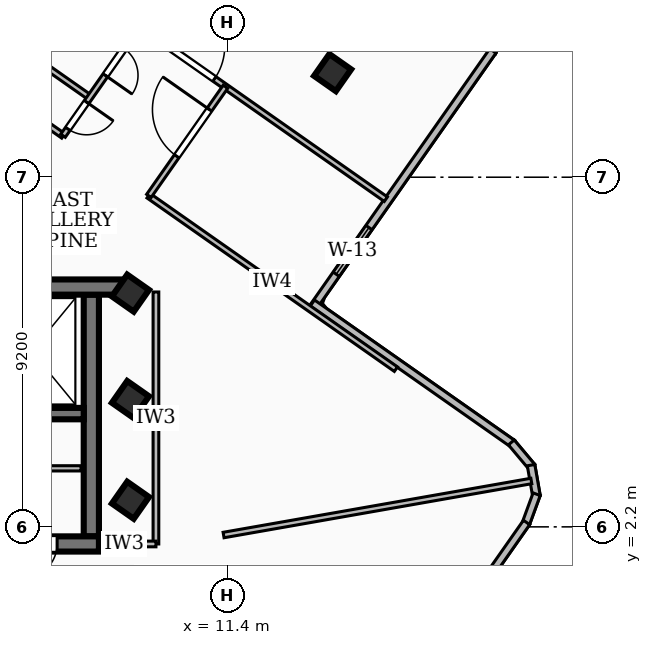
"""IFC4 building model, lengths in metres.
Left out: names, types, materials, properties, quantities, classifications, styles, units other than length and angle.
Written with IfcOpenShell. Run it as: python <this file> out.ifc"""

import sys

from ifc_helpers import new_model, si_unit, direction, frame, frame_2d, origin, origin_2d, place, context, subcontext, project, spatial, rectangle, extrude, element, fill, save


model = new_model("IFC4")
c1 = context("Model", 3, precision=1e-05, world=origin(), true_north=direction((0.0, 1.0)))
c2 = subcontext(c1, "Body", "Model", "MODEL_VIEW")
j1 = project(units=[si_unit("LENGTHUNIT", "METRE"), si_unit("PLANEANGLEUNIT", "RADIAN")], contexts=[c1])
p1 = place(None, origin())
s1 = spatial("IfcSite", under=j1, at=p1, CompositionType="ELEMENT")
p2 = place(p1, origin())
s2 = spatial("IfcBuilding", under=s1, at=p2, CompositionType="ELEMENT")
p3 = place(p2, frame((0.0, 0.0, 268.02)))
s3 = spatial("IfcBuildingStorey", under=s2, at=p3, CompositionType="ELEMENT", Elevation=268.02)
p4 = place(p3, frame((-8.78, 8.51, 0.0), z_axis=(0.0, 0.0, 1.0), x_axis=(1.0, 0.0, 0.0)))
e1 = element("IfcWall", 1, at=p4, inside=s3, PredefinedType="SHEAR", context=c2, shape_type="SweptSolid", body=[
    extrude(rectangle(XDim=17.56, YDim=0.4, at=frame_2d((8.78, 0.0))), origin(), (0.0, 0.0, 1.0), 3.16),
])
p5 = place(p3, frame((8.02, 1.75, 0.0), z_axis=(0.0, 0.0, 1.0), x_axis=(-1.0, 0.0, 0.0)))
e2 = element("IfcWall", 2, at=p5, inside=s3, PredefinedType="SHEAR", context=c2, shape_type="SweptSolid", body=[
    extrude(rectangle(XDim=16.04, YDim=0.4, at=frame_2d((8.02, 0.0))), origin(), (0.0, 0.0, 1.0), 3.16),
])
p6 = place(p5, frame((7.45, 0.0, 0.0)))
e3 = element("IfcOpeningElement", 3, at=p6, cuts=e2, PredefinedType="OPENING", context=c2, shape_type="SweptSolid", body=[
    extrude(rectangle(XDim=1.0, YDim=2.1, at=frame_2d((0.5, 1.05))), frame((0.0, 0.21, 0.0), z_axis=(0.0, -1.0, 0.0), x_axis=(1.0, 0.0, 0.0)), (0.0, 0.0, 1.0), 0.42),
])
p7 = place(p5, frame((14.285, 0.0, 0.0)))
e4 = element("IfcOpeningElement", 4, at=p7, cuts=e2, PredefinedType="OPENING", context=c2, shape_type="SweptSolid", body=[
    extrude(rectangle(XDim=1.05, YDim=2.15, at=frame_2d((0.525, 1.075))), frame((0.0, 0.21, 0.0), z_axis=(0.0, -1.0, 0.0), x_axis=(1.0, 0.0, 0.0)), (0.0, 0.0, 1.0), 0.42),
])
p8 = place(p5, frame((12.725, 0.0, 0.0)))
e5 = element("IfcOpeningElement", 5, at=p8, cuts=e2, PredefinedType="OPENING", context=c2, shape_type="SweptSolid", body=[
    extrude(rectangle(XDim=1.05, YDim=2.15, at=frame_2d((0.525, 1.075))), frame((0.0, 0.21, 0.0), z_axis=(0.0, -1.0, 0.0), x_axis=(1.0, 0.0, 0.0)), (0.0, 0.0, 1.0), 0.42),
])
p9 = place(p5, frame((11.165, 0.0, 0.0)))
e6 = element("IfcOpeningElement", 6, at=p9, cuts=e2, PredefinedType="OPENING", context=c2, shape_type="SweptSolid", body=[
    extrude(rectangle(XDim=1.05, YDim=2.15, at=frame_2d((0.525, 1.075))), frame((0.0, 0.21, 0.0), z_axis=(0.0, -1.0, 0.0), x_axis=(1.0, 0.0, 0.0)), (0.0, 0.0, 1.0), 0.42),
])
p10 = place(p5, frame((3.4, 0.0, 0.0)))
e7 = element("IfcOpeningElement", 7, at=p10, cuts=e2, PredefinedType="OPENING", context=c2, shape_type="SweptSolid", body=[
    extrude(rectangle(XDim=0.9, YDim=2.06, at=frame_2d((0.45, 1.03))), frame((0.0, 0.21, 0.0), z_axis=(0.0, -1.0, 0.0), x_axis=(1.0, 0.0, 0.0)), (0.0, 0.0, 1.0), 0.42),
])
p11 = place(p5, frame((1.1, 0.0, 0.0)))
e8 = element("IfcOpeningElement", 8, at=p11, cuts=e2, PredefinedType="OPENING", context=c2, shape_type="SweptSolid", body=[
    extrude(rectangle(XDim=0.9, YDim=2.06, at=frame_2d((0.45, 1.03))), frame((0.0, 0.21, 0.0), z_axis=(0.0, -1.0, 0.0), x_axis=(1.0, 0.0, 0.0)), (0.0, 0.0, 1.0), 0.42),
])
p12 = place(p3, frame((7.82, 8.31, 0.0), z_axis=(0.0, 0.0, 1.0), x_axis=(0.0, -1.0, 0.0)))
e9 = element("IfcWall", 9, at=p12, inside=s3, PredefinedType="SHEAR", context=c2, shape_type="SweptSolid", body=[
    extrude(rectangle(XDim=6.36, YDim=0.4, at=frame_2d((3.18, 0.0))), origin(), (0.0, 0.0, 1.0), 3.16),
])
p13 = place(p3, frame((7.62, 5.18, 0.0), z_axis=(0.0, 0.0, 1.0), x_axis=(-1.0, 0.0, 0.0)))
e10 = element("IfcWall", 10, at=p13, inside=s3, PredefinedType="SOLIDWALL", context=c2, shape_type="SweptSolid", body=[
    extrude(rectangle(XDim=15.24, YDim=0.3, at=frame_2d((7.62, 0.0))), origin(), (0.0, 0.0, 1.0), 3.16),
])
p14 = place(p13, frame((5.77, 0.0, 0.0)))
e11 = element("IfcOpeningElement", 11, at=p14, cuts=e10, PredefinedType="OPENING", context=c2, shape_type="SweptSolid", body=[
    extrude(rectangle(XDim=1.1, YDim=2.15, at=frame_2d((0.55, 1.075))), frame((0.0, 0.16, 0.0), z_axis=(0.0, -1.0, 0.0), x_axis=(1.0, 0.0, 0.0)), (0.0, 0.0, 1.0), 0.32),
])
p15 = place(p13, frame((2.97, 0.0, 0.0)))
e12 = element("IfcOpeningElement", 12, at=p15, cuts=e10, PredefinedType="OPENING", context=c2, shape_type="SweptSolid", body=[
    extrude(rectangle(XDim=1.1, YDim=2.15, at=frame_2d((0.55, 1.075))), frame((0.0, 0.16, 0.0), z_axis=(0.0, -1.0, 0.0), x_axis=(1.0, 0.0, 0.0)), (0.0, 0.0, 1.0), 0.32),
])
p16 = place(p13, frame((7.97, 0.0, 0.0)))
e13 = element("IfcOpeningElement", 13, at=p16, cuts=e10, PredefinedType="OPENING", context=c2, shape_type="SweptSolid", body=[
    extrude(rectangle(XDim=1.0, YDim=2.1, at=frame_2d((0.5, 1.05))), frame((0.0, 0.16, 0.0), z_axis=(0.0, -1.0, 0.0), x_axis=(1.0, 0.0, 0.0)), (0.0, 0.0, 1.0), 0.32),
])
for number, where, z_axis, x_axis in (
    (14, (8.85, 2.9, 0.0), (0.0, 0.0, 1.0), (0.574, 0.819, 0.0)),
    (15, (8.85, 5.55, 0.0), (0.0, 0.0, 1.0), (0.574, 0.819, 0.0)),
    (16, (8.85, 8.35, 0.0), (0.0, 0.0, 1.0), (0.574, 0.819, 0.0)),
    (17, (14.169, 14.152, 0.0), (0.0, 0.0, 1.0), (0.574, 0.819, 0.0)),
):
    element("IfcColumn", number, at=place(p3, frame(where, z_axis=z_axis, x_axis=x_axis)), inside=s3, PredefinedType="COLUMN", context=c2, shape_type="SweptSolid", body=[
        extrude(rectangle(XDim=0.7, YDim=0.7, at=origin_2d()), origin(), (0.0, 0.0, 1.0), 3.42),
    ])
p17 = place(p3, frame((18.651, 15.467, 0.0), z_axis=(0.0, 0.0, 1.0), x_axis=(-0.343826172689, -0.939033313027, 0.0)))
e18 = element("IfcWall", 18, at=p17, inside=s3, PredefinedType="SOLIDWALL", context=c2, shape_type="SweptSolid", body=[
    extrude(rectangle(XDim=0.837, YDim=0.2, at=frame_2d((0.418, 0.0))), origin(), (0.0, 0.0, 1.0), 3.16),
])
p18 = place(p3, frame((18.386, 14.724, 0.0), z_axis=(0.0, 0.0, 1.0), x_axis=(-0.574193796103, -0.818719417454, 0.0)))
e19 = element("IfcWall", 19, at=p18, inside=s3, PredefinedType="SOLIDWALL", context=c2, shape_type="SweptSolid", body=[
    extrude(rectangle(XDim=8.241, YDim=0.2, at=frame_2d((4.121, 0.0))), origin(), (0.0, 0.0, 1.0), 3.16),
])
p19 = place(p18, frame((5.678, 0.0, 0.85)))
e20 = element("IfcOpeningElement", 20, at=p19, cuts=e19, PredefinedType="OPENING", context=c2, shape_type="SweptSolid", body=[
    extrude(rectangle(XDim=1.5, YDim=1.8, at=frame_2d((0.75, 0.9))), frame((0.0, 0.11, 0.0), z_axis=(0.0, -1.0, 0.0), x_axis=(1.0, 0.0, 0.0)), (0.0, 0.0, 1.0), 0.22),
])
p20 = place(p3, frame((13.635, 8.088, 0.0), z_axis=(0.0, 0.0, 1.0), x_axis=(0.818654548261, -0.574286279317, 0.0)))
e21 = element("IfcWall", 21, at=p20, inside=s3, PredefinedType="SOLIDWALL", context=c2, shape_type="SweptSolid", body=[
    extrude(rectangle(XDim=6.441, YDim=0.2, at=frame_2d((3.22, 0.0))), origin(), (0.0, 0.0, 1.0), 3.16),
])
p21 = place(p3, frame((18.872, 4.422, 0.0), z_axis=(0.0, 0.0, 1.0), x_axis=(0.642816318642, -0.766020352528, 0.0)))
e22 = element("IfcWall", 22, at=p21, inside=s3, PredefinedType="SOLIDWALL", context=c2, shape_type="SweptSolid", body=[
    extrude(rectangle(XDim=0.838, YDim=0.2, at=frame_2d((0.419, 0.0))), origin(), (0.0, 0.0, 1.0), 3.16),
])
p22 = place(p3, frame((19.391, 3.824, 0.0), z_axis=(0.0, 0.0, 1.0), x_axis=(0.171877988141, -0.985118245285, 0.0)))
e23 = element("IfcWall", 23, at=p22, inside=s3, PredefinedType="SOLIDWALL", context=c2, shape_type="SweptSolid", body=[
    extrude(rectangle(XDim=0.825, YDim=0.2, at=frame_2d((0.413, 0.0))), origin(), (0.0, 0.0, 1.0), 3.16),
])
p23 = place(p3, frame((19.538, 3.059, 0.0), z_axis=(0.0, 0.0, 1.0), x_axis=(-0.344083284363, -0.938939131905, 0.0)))
e24 = element("IfcWall", 24, at=p23, inside=s3, PredefinedType="SOLIDWALL", context=c2, shape_type="SweptSolid", body=[
    extrude(rectangle(XDim=0.837, YDim=0.2, at=frame_2d((0.418, 0.0))), origin(), (0.0, 0.0, 1.0), 3.16),
])
p24 = place(p3, frame((19.273, 2.316, 0.0), z_axis=(0.0, 0.0, 1.0), x_axis=(-0.574227764949, -0.818695592978, 0.0)))
e25 = element("IfcWall", 25, at=p24, inside=s3, PredefinedType="SOLIDWALL", context=c2, shape_type="SweptSolid", body=[
    extrude(rectangle(XDim=6.741, YDim=0.2, at=frame_2d((3.371, 0.0))), origin(), (0.0, 0.0, 1.0), 3.16),
])
p25 = place(p3, frame((2.9, 3.74, 0.0), z_axis=(0.0, 0.0, 1.0), x_axis=(1.0, 0.0, 0.0)))
e26 = element("IfcWall", 26, at=p25, inside=s3, PredefinedType="PARTITIONING", context=c2, shape_type="SweptSolid", body=[
    extrude(rectangle(XDim=4.65, YDim=0.138, at=frame_2d((2.325, 0.0))), origin(), (0.0, 0.0, 1.0), 3.16),
])
p26 = place(p3, frame((9.52, 1.75, 0.0), z_axis=(0.0, 0.0, 1.0), x_axis=(0.0, 1.0, 0.0)))
e27 = element("IfcWall", 27, at=p26, inside=s3, PredefinedType="PARTITIONING", context=c2, shape_type="SweptSolid", body=[
    extrude(rectangle(XDim=6.63, YDim=0.15, at=frame_2d((3.315, 0.0))), origin(), (0.0, 0.0, 1.0), 3.16),
])
p27 = place(p3, frame((7.85, 1.75, 0.0), z_axis=(0.0, 0.0, 1.0), x_axis=(1.0, 0.0, 0.0)))
e28 = element("IfcWall", 28, at=p27, inside=s3, PredefinedType="PARTITIONING", context=c2, shape_type="SweptSolid", body=[
    extrude(rectangle(XDim=1.67, YDim=0.15, at=frame_2d((0.835, 0.0))), origin(), (0.0, 0.0, 1.0), 2.39),
])
p28 = place(p3, frame((11.3, 1.985, 0.0), z_axis=(0.0, 0.0, 1.0), x_axis=(0.984932365377, 0.172939976965, 0.0)))
e29 = element("IfcWall", 29, at=p28, inside=s3, PredefinedType="PARTITIONING", context=c2, shape_type="SweptSolid", body=[
    extrude(rectangle(XDim=8.222, YDim=0.145, at=frame_2d((4.111, 0.0))), origin(), (0.0, 0.0, 1.0), 3.16),
])
p29 = place(p3, frame((7.083, 12.487, 0.0), z_axis=(0.0, 0.0, 1.0), x_axis=(-0.818818791344, 0.574052076855, 0.0)))
e30 = element("IfcWall", 30, at=p29, inside=s3, PredefinedType="PARTITIONING", context=c2, shape_type="SweptSolid", body=[
    extrude(rectangle(XDim=8.25, YDim=0.145, at=frame_2d((4.125, 0.0))), origin(), (0.0, 0.0, 1.0), 3.16),
])
p30 = place(p3, frame((15.835, 6.349, 0.0), z_axis=(0.0, 0.0, 1.0), x_axis=(-0.818780073776, 0.57410729902, 0.0)))
e31 = element("IfcWall", 31, at=p30, inside=s3, PredefinedType="PARTITIONING", context=c2, shape_type="SweptSolid", body=[
    extrude(rectangle(XDim=7.95, YDim=0.145, at=frame_2d((3.975, 0.0))), origin(), (0.0, 0.0, 1.0), 2.53),
])
p31 = place(p3, frame((7.765, 13.511, 0.0), z_axis=(0.0, 0.0, 1.0), x_axis=(-0.818761977847, 0.574133106198, 0.0)))
e32 = element("IfcWall", 32, at=p31, inside=s3, PredefinedType="PARTITIONING", context=c2, shape_type="SweptSolid", body=[
    extrude(rectangle(XDim=4.835, YDim=0.145, at=frame_2d((2.418, 0.0))), origin(), (0.0, 0.0, 1.0), 3.16),
])
p32 = place(p3, frame((9.09, 15.366, 0.0), z_axis=(0.0, 0.0, 1.0), x_axis=(-0.574097025606, -0.81878727713, 0.0)))
e33 = element("IfcWall", 33, at=p32, inside=s3, PredefinedType="PARTITIONING", context=c2, shape_type="SweptSolid", body=[
    extrude(rectangle(XDim=3.51, YDim=0.145, at=frame_2d((1.755, 0.0))), origin(), (0.0, 0.0, 1.0), 3.16),
])
p33 = place(p32, frame((2.43, 0.0, 0.0)))
e34 = element("IfcOpeningElement", 34, at=p33, cuts=e33, PredefinedType="OPENING", context=c2, shape_type="SweptSolid", body=[
    extrude(rectangle(XDim=0.86, YDim=2.04, at=frame_2d((0.43, 1.02))), frame((0.0, 0.083, 0.0), z_axis=(0.0, -1.0, 0.0), x_axis=(1.0, 0.0, 0.0)), (0.0, 0.0, 1.0), 0.165),
])
p34 = place(p32, frame((0.71, 0.0, 0.0)))
e35 = element("IfcOpeningElement", 35, at=p34, cuts=e33, PredefinedType="OPENING", context=c2, shape_type="SweptSolid", body=[
    extrude(rectangle(XDim=0.86, YDim=2.04, at=frame_2d((0.43, 1.02))), frame((0.0, 0.083, 0.0), z_axis=(0.0, -1.0, 0.0), x_axis=(1.0, 0.0, 0.0)), (0.0, 0.0, 1.0), 0.165),
])
p35 = place(p3, frame((9.334, 10.908, 0.0), z_axis=(0.0, 0.0, 1.0), x_axis=(0.574414301793, 0.818564725539, 0.0)))
e36 = element("IfcWall", 36, at=p35, inside=s3, PredefinedType="PARTITIONING", context=c2, shape_type="SweptSolid", body=[
    extrude(rectangle(XDim=3.51, YDim=0.145, at=frame_2d((1.755, 0.0))), origin(), (0.0, 0.0, 1.0), 3.16),
])
p36 = place(p35, frame((1.275, 0.0, 0.0)))
e37 = element("IfcOpeningElement", 37, at=p36, cuts=e36, PredefinedType="OPENING", context=c2, shape_type="SweptSolid", body=[
    extrude(rectangle(XDim=1.5, YDim=2.12, at=frame_2d((0.75, 1.06))), frame((0.0, 0.083, 0.0), z_axis=(0.0, -1.0, 0.0), x_axis=(1.0, 0.0, 0.0)), (0.0, 0.0, 1.0), 0.165),
])
p37 = place(p3, frame((5.115, 18.154, 0.0), z_axis=(0.0, 0.0, 1.0), x_axis=(0.818735813326, -0.574170417191, 0.0)))
e38 = element("IfcWall", 38, at=p37, inside=s3, PredefinedType="PARTITIONING", context=c2, shape_type="SweptSolid", body=[
    extrude(rectangle(XDim=12.77, YDim=0.145, at=frame_2d((6.385, 0.0))), origin(), (0.0, 0.0, 1.0), 2.53),
])
p38 = place(p37, frame((5.76, 0.0, 0.0)))
e39 = element("IfcOpeningElement", 39, at=p38, cuts=e38, PredefinedType="OPENING", context=c2, shape_type="SweptSolid", body=[
    extrude(rectangle(XDim=1.5, YDim=2.12, at=frame_2d((0.75, 1.06))), frame((0.0, 0.083, 0.0), z_axis=(0.0, -1.0, 0.0), x_axis=(1.0, 0.0, 0.0)), (0.0, 0.0, 1.0), 0.165),
])
p39 = place(p19, origin())
e40 = element("IfcWindow", 40, at=p39, inside=s3, PartitioningType="SINGLE_PANEL", PredefinedType="WINDOW", context=c2, shape_type="SweptSolid", body=[
    extrude(rectangle(XDim=1.5, YDim=1.8, at=frame_2d((0.75, 0.9))), frame((0.0, 0.03, 0.0), z_axis=(0.0, -1.0, 0.0), x_axis=(1.0, 0.0, 0.0)), (0.0, 0.0, 1.0), 0.06),
])
fill(e20, e40)
p40 = place(p11, origin())
e41 = element("IfcDoor", 41, at=p40, inside=s3, OperationType="SINGLE_SWING_RIGHT", PredefinedType="DOOR", context=c2, shape_type="SweptSolid", body=[
    extrude(rectangle(XDim=0.9, YDim=2.06, at=frame_2d((0.45, 1.03))), frame((0.0, 0.025, 0.0), z_axis=(0.0, -1.0, 0.0), x_axis=(1.0, 0.0, 0.0)), (0.0, 0.0, 1.0), 0.05),
])
fill(e8, e41)
p41 = place(p33, origin())
e42 = element("IfcDoor", 42, at=p41, inside=s3, OperationType="SINGLE_SWING_LEFT", PredefinedType="DOOR", context=c2, shape_type="SweptSolid", body=[
    extrude(rectangle(XDim=0.86, YDim=2.04, at=frame_2d((0.43, 1.02))), frame((0.0, 0.025, 0.0), z_axis=(0.0, -1.0, 0.0), x_axis=(1.0, 0.0, 0.0)), (0.0, 0.0, 1.0), 0.05),
])
fill(e34, e42)
p42 = place(p34, origin())
e43 = element("IfcDoor", 43, at=p42, inside=s3, OperationType="SINGLE_SWING_RIGHT", PredefinedType="DOOR", context=c2, shape_type="SweptSolid", body=[
    extrude(rectangle(XDim=0.86, YDim=2.04, at=frame_2d((0.43, 1.02))), frame((0.0, 0.025, 0.0), z_axis=(0.0, -1.0, 0.0), x_axis=(1.0, 0.0, 0.0)), (0.0, 0.0, 1.0), 0.05),
])
fill(e35, e43)
p43 = place(p36, origin())
e44 = element("IfcDoor", 44, at=p43, inside=s3, OperationType="SINGLE_SWING_RIGHT", PredefinedType="DOOR", context=c2, shape_type="SweptSolid", body=[
    extrude(rectangle(XDim=1.5, YDim=2.12, at=frame_2d((0.75, 1.06))), frame((0.0, 0.025, 0.0), z_axis=(0.0, -1.0, 0.0), x_axis=(1.0, 0.0, 0.0)), (0.0, 0.0, 1.0), 0.05),
])
fill(e37, e44)
p44 = place(p38, origin())
e45 = element("IfcDoor", 45, at=p44, inside=s3, OperationType="SINGLE_SWING_LEFT", PredefinedType="DOOR", context=c2, shape_type="SweptSolid", body=[
    extrude(rectangle(XDim=1.5, YDim=2.12, at=frame_2d((0.75, 1.06))), frame((0.0, 0.025, 0.0), z_axis=(0.0, -1.0, 0.0), x_axis=(1.0, 0.0, 0.0)), (0.0, 0.0, 1.0), 0.05),
])
fill(e39, e45)
save(model, sys.argv[1])
